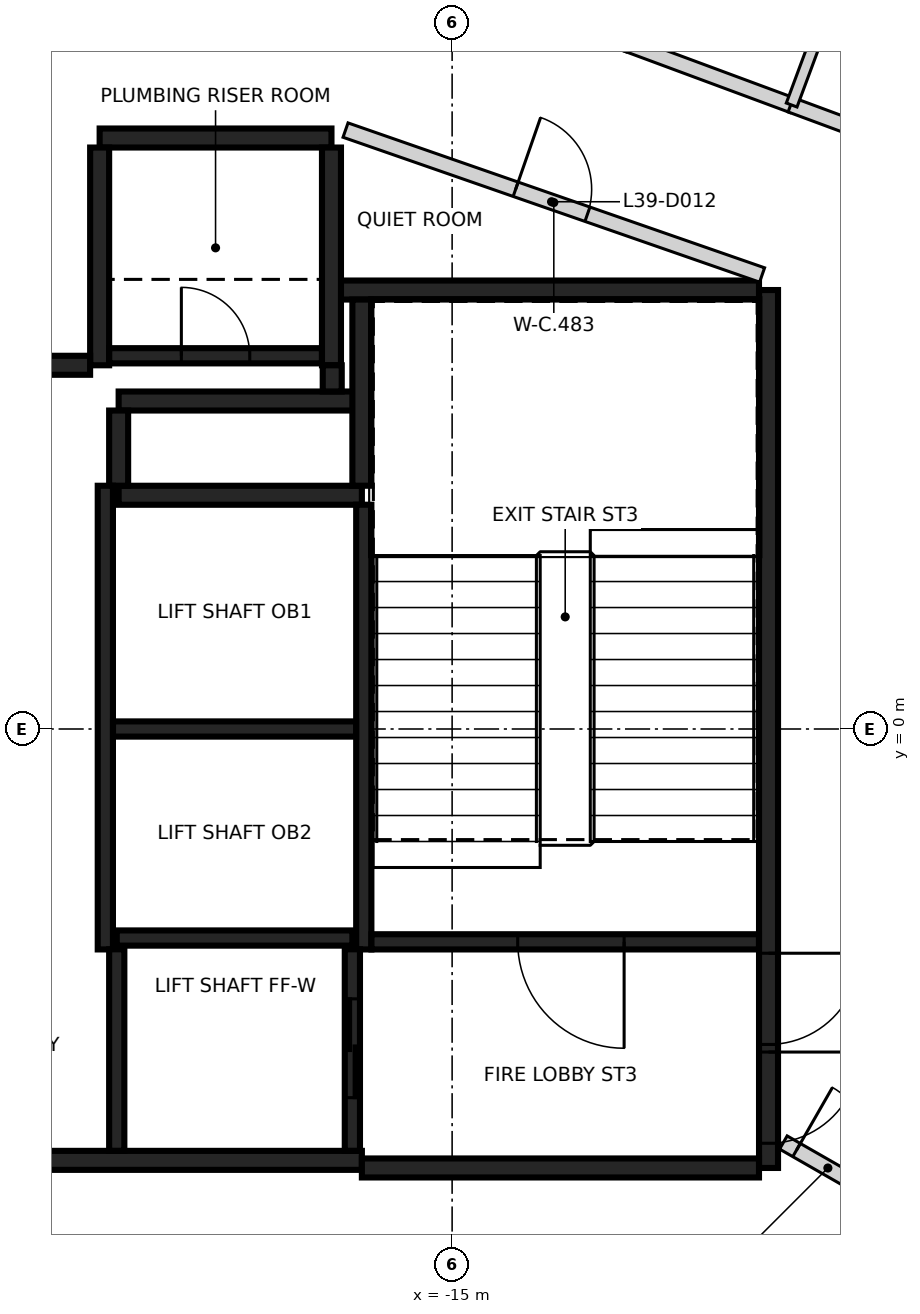
"""IFC4 building model, lengths in metres.
Left out: names, types, materials, properties, quantities, classifications, styles, units other than length and angle.
Written with IfcOpenShell. Run it as: python <this file> out.ifc"""

import sys

from ifc_helpers import new_model, si_unit, direction, frame, frame_2d, origin, place, context, subcontext, project, spatial, rectangle, extrude, element, fill, save


model = new_model("IFC4")
c1 = context("Model", 3, precision=1e-05, world=origin(), true_north=direction((0.0, 1.0)))
c2 = subcontext(c1, "Body", "Model", "MODEL_VIEW")
j1 = project(units=[si_unit("LENGTHUNIT", "METRE"), si_unit("PLANEANGLEUNIT", "RADIAN")], contexts=[c1])
p1 = place(None, origin())
s1 = spatial("IfcSite", under=j1, at=p1, CompositionType="ELEMENT")
p2 = place(p1, origin())
s2 = spatial("IfcBuilding", under=s1, at=p2, CompositionType="ELEMENT")
p3 = place(p2, frame((0.0, 0.0, 157.6)))
s3 = spatial("IfcBuildingStorey", under=s2, at=p3, CompositionType="ELEMENT", Elevation=157.6)
p4 = place(p3, frame((-10.837, 5.775, 0.0), z_axis=(0.0, 0.0, 1.0), x_axis=(0.0, -1.0, 0.0)))
e1 = element("IfcWall", 1, at=p4, inside=s3, PredefinedType="SHEAR", context=c2, shape_type="SweptSolid", body=[
    extrude(rectangle(XDim=11.55, YDim=0.25, at=frame_2d((5.775, 0.0))), origin(), (0.0, 0.0, 1.0), 3.2),
])
p5 = place(p4, frame((10.025, 0.0, 0.0)))
e2 = element("IfcOpeningElement", 2, at=p5, cuts=e1, PredefinedType="OPENING", context=c2, shape_type="SweptSolid", body=[
    extrude(rectangle(XDim=1.2, YDim=2.1, at=frame_2d((0.6, 1.05))), frame((0.0, 0.135, 0.0), z_axis=(0.0, -1.0, 0.0), x_axis=(1.0, 0.0, 0.0)), (0.0, 0.0, 1.0), 0.27),
])
p6 = place(p4, frame((8.725, 0.0, 0.0)))
e3 = element("IfcOpeningElement", 3, at=p6, cuts=e1, PredefinedType="OPENING", context=c2, shape_type="SweptSolid", body=[
    extrude(rectangle(XDim=1.2, YDim=2.1, at=frame_2d((0.6, 1.05))), frame((0.0, 0.135, 0.0), z_axis=(0.0, -1.0, 0.0), x_axis=(1.0, 0.0, 0.0)), (0.0, 0.0, 1.0), 0.27),
])
p7 = place(p3, frame((-16.187, -5.675, 0.0), z_axis=(0.0, 0.0, 1.0), x_axis=(-1.0, 0.0, 0.0)))
e4 = element("IfcWall", 4, at=p7, inside=s3, PredefinedType="SHEAR", context=c2, shape_type="SweptSolid", body=[
    extrude(rectangle(XDim=6.25, YDim=0.25, at=frame_2d((3.125, 0.0))), origin(), (0.0, 0.0, 1.0), 3.2),
])
p8 = place(p3, frame((-10.963, -5.775, 0.0), z_axis=(0.0, 0.0, 1.0), x_axis=(-1.0, 0.0, 0.0)))
e5 = element("IfcWall", 5, at=p8, inside=s3, PredefinedType="SHEAR", context=c2, shape_type="SweptSolid", body=[
    extrude(rectangle(XDim=5.225, YDim=0.25, at=frame_2d((2.612, 0.0))), origin(), (0.0, 0.0, 1.0), 3.2),
])
p9 = place(p3, frame((-16.472, 5.775, 0.0), z_axis=(0.0, 0.0, 1.0), x_axis=(1.0, 0.0, 0.0)))
e6 = element("IfcWall", 6, at=p9, inside=s3, PredefinedType="SHEAR", context=c2, shape_type="SweptSolid", body=[
    extrude(rectangle(XDim=5.51, YDim=0.25, at=frame_2d((2.755, 0.0))), origin(), (0.0, 0.0, 1.0), 3.2),
])
p10 = place(p3, frame((-19.387, 3.075, 0.0), z_axis=(0.0, 0.0, 1.0), x_axis=(1.0, 0.0, 0.0)))
e7 = element("IfcWall", 7, at=p10, inside=s3, PredefinedType="SHEAR", context=c2, shape_type="SweptSolid", body=[
    extrude(rectangle(XDim=3.2, YDim=0.25, at=frame_2d((1.6, 0.0))), origin(), (0.0, 0.0, 1.0), 3.2),
])
p11 = place(p3, frame((-19.637, 7.775, 0.0), z_axis=(0.0, 0.0, 1.0), x_axis=(1.0, 0.0, 0.0)))
e8 = element("IfcWall", 8, at=p11, inside=s3, PredefinedType="SHEAR", context=c2, shape_type="SweptSolid", body=[
    extrude(rectangle(XDim=3.05, YDim=0.25, at=frame_2d((1.525, 0.0))), origin(), (0.0, 0.0, 1.0), 3.2),
])
for number, where, z_axis, x_axis in (
    (9, (-16.587, 7.65, 0.0), (0.0, 0.0, 1.0), (0.0, -1.0, 0.0)),
    (10, (-19.637, 4.785, 0.0), (0.0, 0.0, 1.0), (0.0, 1.0, 0.0)),
):
    element("IfcWall", number, at=place(p3, frame(where, z_axis=z_axis, x_axis=x_axis)), inside=s3, PredefinedType="SHEAR", context=c2, shape_type="SweptSolid", body=[
        extrude(rectangle(XDim=2.865, YDim=0.25, at=frame_2d((1.432, 0.0))), origin(), (0.0, 0.0, 1.0), 3.2),
    ])
p12 = place(p3, frame((-16.302, 4.315, 0.0), z_axis=(0.0, 0.0, 1.0), x_axis=(-1.0, 0.0, 0.0)))
e11 = element("IfcWall", 11, at=p12, inside=s3, PredefinedType="SHEAR", context=c2, shape_type="SweptSolid", body=[
    extrude(rectangle(XDim=3.085, YDim=0.25, at=frame_2d((1.542, 0.0))), origin(), (0.0, 0.0, 1.0), 3.2),
])
p13 = place(p3, frame((-16.187, 3.2, 0.0), z_axis=(0.0, 0.0, 1.0), x_axis=(0.0, 1.0, 0.0)))
e12 = element("IfcWall", 12, at=p13, inside=s3, PredefinedType="SHEAR", context=c2, shape_type="SweptSolid", body=[
    extrude(rectangle(XDim=2.449, YDim=0.25, at=frame_2d((1.225, 0.0))), origin(), (0.0, 0.0, 1.0), 3.2),
])
p14 = place(p3, frame((-19.387, 4.19, 0.0), z_axis=(0.0, 0.0, 1.0), x_axis=(0.0, -1.0, 0.0)))
e13 = element("IfcWall", 13, at=p14, inside=s3, PredefinedType="SHEAR", context=c2, shape_type="SweptSolid", body=[
    extrude(rectangle(XDim=0.989, YDim=0.25, at=frame_2d((0.495, 0.0))), origin(), (0.0, 0.0, 1.0), 3.2),
])
p15 = place(p3, frame((-20.447, 4.785, 0.0), z_axis=(0.0, 0.0, 1.0), x_axis=(1.0, 0.0, 0.0)))
e14 = element("IfcWall", 14, at=p15, inside=s3, PredefinedType="SHEAR", context=c2, shape_type="SweptSolid", body=[
    extrude(rectangle(XDim=0.685, YDim=0.25, at=frame_2d((0.342, 0.0))), origin(), (0.0, 0.0, 1.0), 3.2),
])
p16 = place(p3, frame((-16.577, 4.785, 0.0), z_axis=(0.0, 0.0, 1.0), x_axis=(0.0, -1.0, 0.0)))
e15 = element("IfcWall", 15, at=p16, inside=s3, PredefinedType="SHEAR", context=c2, shape_type="SweptSolid", body=[
    extrude(rectangle(XDim=0.344, YDim=0.25, at=frame_2d((0.172, 0.0))), origin(), (0.0, 0.0, 1.0), 3.2),
])
p17 = place(p3, frame((-16.162, 2.951, 0.0), z_axis=(0.0, 0.0, 1.0), x_axis=(0.0, -1.0, 0.0)))
e16 = element("IfcWall", 16, at=p17, inside=s3, PredefinedType="SHEAR", context=c2, shape_type="SweptSolid", body=[
    extrude(rectangle(XDim=5.851, YDim=0.2, at=frame_2d((2.925, 0.0))), origin(), (0.0, 0.0, 1.0), 3.2),
])
p18 = place(p3, frame((-19.562, -2.9, 0.0), z_axis=(0.0, 0.0, 1.0), x_axis=(0.0, 1.0, 0.0)))
e17 = element("IfcWall", 17, at=p18, inside=s3, PredefinedType="SHEAR", context=c2, shape_type="SweptSolid", body=[
    extrude(rectangle(XDim=6.1, YDim=0.2, at=frame_2d((3.05, 0.0))), origin(), (0.0, 0.0, 1.0), 3.2),
])
p19 = place(p3, frame((-10.963, -2.8, 0.0), z_axis=(0.0, 0.0, 1.0), x_axis=(-1.0, 0.0, 0.0)))
e18 = element("IfcWall", 18, at=p19, inside=s3, PredefinedType="SHEAR", context=c2, shape_type="SweptSolid", body=[
    extrude(rectangle(XDim=5.098, YDim=0.2, at=frame_2d((2.549, 0.0))), origin(), (0.0, 0.0, 1.0), 3.2),
])
p20 = place(p19, frame((1.774, 0.0, 0.0)))
e19 = element("IfcOpeningElement", 19, at=p20, cuts=e18, PredefinedType="OPENING", context=c2, shape_type="SweptSolid", body=[
    extrude(rectangle(XDim=1.4, YDim=2.1, at=frame_2d((0.7, 1.05))), frame((0.0, 0.11, 0.0), z_axis=(0.0, -1.0, 0.0), x_axis=(1.0, 0.0, 0.0)), (0.0, 0.0, 1.0), 0.22),
])
p21 = place(p3, frame((-16.263, 0.0, 0.0), z_axis=(0.0, 0.0, 1.0), x_axis=(-1.0, 0.0, 0.0)))
e20 = element("IfcWall", 20, at=p21, inside=s3, PredefinedType="SHEAR", context=c2, shape_type="SweptSolid", body=[
    extrude(rectangle(XDim=3.198, YDim=0.2, at=frame_2d((1.599, 0.0))), origin(), (0.0, 0.0, 1.0), 3.2),
])
p22 = place(p3, frame((-19.511, 4.91, 0.0), z_axis=(0.0, 0.0, 1.0), x_axis=(1.0, 0.0, 0.0)))
e21 = element("IfcWall", 21, at=p22, inside=s3, PredefinedType="SHEAR", context=c2, shape_type="SweptSolid", body=[
    extrude(rectangle(XDim=2.798, YDim=0.2, at=frame_2d((1.399, 0.0))), origin(), (0.0, 0.0, 1.0), 3.2),
])
p23 = place(p22, frame((0.949, 0.0, 0.0)))
e22 = element("IfcOpeningElement", 22, at=p23, cuts=e21, PredefinedType="OPENING", context=c2, shape_type="SweptSolid", body=[
    extrude(rectangle(XDim=0.9, YDim=2.1, at=frame_2d((0.45, 1.05))), frame((0.0, 0.11, 0.0), z_axis=(0.0, -1.0, 0.0), x_axis=(1.0, 0.0, 0.0)), (0.0, 0.0, 1.0), 0.22),
])
p24 = place(p3, frame((-19.412, -2.75, 0.0), z_axis=(0.0, 0.0, 1.0), x_axis=(1.0, 0.0, 0.0)))
e23 = element("IfcWall", 23, at=p24, inside=s3, PredefinedType="SHEAR", context=c2, shape_type="SweptSolid", body=[
    extrude(rectangle(XDim=3.1, YDim=0.2, at=frame_2d((1.55, 0.0))), origin(), (0.0, 0.0, 1.0), 3.2),
])
p25 = place(p3, frame((-16.312, -2.898, 0.0), z_axis=(0.0, 0.0, 1.0), x_axis=(0.0, -1.0, 0.0)))
e24 = element("IfcWall", 24, at=p25, inside=s3, PredefinedType="SHEAR", context=c2, shape_type="SweptSolid", body=[
    extrude(rectangle(XDim=2.651, YDim=0.2, at=frame_2d((1.325, 0.0))), origin(), (0.0, 0.0, 1.0), 3.2),
])
p26 = place(p25, frame((0.652, 0.0, 0.0)))
e25 = element("IfcOpeningElement", 25, at=p26, cuts=e24, PredefinedType="OPENING", context=c2, shape_type="SweptSolid", body=[
    extrude(rectangle(XDim=1.3, YDim=2.1, at=frame_2d((0.65, 1.05))), frame((0.0, 0.11, 0.0), z_axis=(0.0, -1.0, 0.0), x_axis=(1.0, 0.0, 0.0)), (0.0, 0.0, 1.0), 0.22),
])
p27 = place(p3, frame((-19.412, -5.549, 0.0), z_axis=(0.0, 0.0, 1.0), x_axis=(0.0, 1.0, 0.0)))
e26 = element("IfcWall", 26, at=p27, inside=s3, PredefinedType="SHEAR", context=c2, shape_type="SweptSolid", body=[
    extrude(rectangle(XDim=2.651, YDim=0.2, at=frame_2d((1.325, 0.0))), origin(), (0.0, 0.0, 1.0), 3.2),
])
p28 = place(p3, frame((-16.402, 7.879, 0.0), z_axis=(0.0, 0.0, 1.0), x_axis=(0.944492255471, -0.328533680702, 0.0)))
e27 = element("IfcWall", 27, at=p28, inside=s3, PredefinedType="PARTITIONING", context=c2, shape_type="SweptSolid", body=[
    extrude(rectangle(XDim=5.802, YDim=0.2, at=frame_2d((2.901, 0.0))), origin(), (0.0, 0.0, 1.0), 3.2),
])
p29 = place(p28, frame((2.37, 0.0, 0.0)))
e28 = element("IfcOpeningElement", 28, at=p29, cuts=e27, PredefinedType="OPENING", context=c2, shape_type="SweptSolid", body=[
    extrude(rectangle(XDim=1.0, YDim=2.1, at=frame_2d((0.5, 1.05))), frame((0.0, 0.11, 0.0), z_axis=(0.0, -1.0, 0.0), x_axis=(1.0, 0.0, 0.0)), (0.0, 0.0, 1.0), 0.22),
])
p30 = place(p3, frame((-12.699, 9.011, 0.0), z_axis=(0.0, 0.0, 1.0), x_axis=(0.937666284737, -0.347536959858, 0.0)))
e29 = element("IfcWall", 29, at=p30, inside=s3, PredefinedType="PARTITIONING", context=c2, shape_type="SweptSolid", body=[
    extrude(rectangle(XDim=2.322, YDim=0.2, at=frame_2d((1.161, 0.0))), origin(), (0.0, 0.0, 1.0), 3.2),
])
p31 = place(p3, frame((-10.642, -5.44, 0.0), z_axis=(0.0, 0.0, 1.0), x_axis=(0.867610688994, -0.497244097344, 0.0)))
e30 = element("IfcWall", 30, at=p31, inside=s3, PredefinedType="PARTITIONING", context=c2, shape_type="SweptSolid", body=[
    extrude(rectangle(XDim=10.464, YDim=0.2, at=frame_2d((5.232, 0.0))), origin(), (0.0, 0.0, 1.0), 3.2),
])
p32 = place(p31, frame((0.2, 0.0, 0.0)))
e31 = element("IfcOpeningElement", 31, at=p32, cuts=e30, PredefinedType="OPENING", context=c2, shape_type="SweptSolid", body=[
    extrude(rectangle(XDim=0.95, YDim=2.1, at=frame_2d((0.475, 1.05))), frame((0.0, 0.11, 0.0), z_axis=(0.0, -1.0, 0.0), x_axis=(1.0, 0.0, 0.0)), (0.0, 0.0, 1.0), 0.22),
])
p33 = place(p31, frame((7.519, 0.0, 0.0)))
e32 = element("IfcOpeningElement", 32, at=p33, cuts=e30, PredefinedType="OPENING", context=c2, shape_type="SweptSolid", body=[
    extrude(rectangle(XDim=0.95, YDim=2.1, at=frame_2d((0.475, 1.05))), frame((0.0, 0.11, 0.0), z_axis=(0.0, -1.0, 0.0), x_axis=(1.0, 0.0, 0.0)), (0.0, 0.0, 1.0), 0.22),
])
p34 = place(p31, frame((8.846, 0.0, 0.0)))
e33 = element("IfcOpeningElement", 33, at=p34, cuts=e30, PredefinedType="OPENING", context=c2, shape_type="SweptSolid", body=[
    extrude(rectangle(XDim=0.95, YDim=2.1, at=frame_2d((0.475, 1.05))), frame((0.0, 0.11, 0.0), z_axis=(0.0, -1.0, 0.0), x_axis=(1.0, 0.0, 0.0)), (0.0, 0.0, 1.0), 0.22),
])
p35 = place(p3, frame((-10.545, 8.212, 0.0), z_axis=(0.0, 0.0, 1.0), x_axis=(0.937637162141, -0.347615523491, 0.0)))
e34 = element("IfcWall", 34, at=p35, inside=s3, PredefinedType="PARTITIONING", context=c2, shape_type="SweptSolid", body=[
    extrude(rectangle(XDim=1.61, YDim=0.2, at=frame_2d((0.805, 0.0))), origin(), (0.0, 0.0, 1.0), 3.2),
])
p36 = place(p3, frame((-12.279, 16.946, 0.0), z_axis=(0.0, 0.0, 1.0), x_axis=(0.500003997498, -0.866023095816, 0.0)))
e35 = element("IfcWall", 35, at=p36, inside=s3, PredefinedType="PARTITIONING", context=c2, shape_type="SweptSolid", body=[
    extrude(rectangle(XDim=10.809, YDim=0.2, at=frame_2d((5.405, 0.0))), origin(), (0.0, 0.0, 1.0), 3.2),
])
p37 = place(p3, frame((-10.533, 8.209, 0.0), z_axis=(0.0, 0.0, 1.0), x_axis=(0.348035300423, 0.937481428968, 0.0)))
e36 = element("IfcWall", 36, at=p37, inside=s3, PredefinedType="PARTITIONING", context=c2, shape_type="SweptSolid", body=[
    extrude(rectangle(XDim=3.0, YDim=0.15, at=frame_2d((1.5, 0.0))), origin(), (0.0, 0.0, 1.0), 3.2),
])
p38 = place(p37, frame((1.1, 0.0, 0.0)))
e37 = element("IfcOpeningElement", 37, at=p38, cuts=e36, PredefinedType="OPENING", context=c2, shape_type="SweptSolid", body=[
    extrude(rectangle(XDim=0.8, YDim=2.1, at=frame_2d((0.4, 1.05))), frame((0.0, 0.085, 0.0), z_axis=(0.0, -1.0, 0.0), x_axis=(1.0, 0.0, 0.0)), (0.0, 0.0, 1.0), 0.17),
])
p39 = place(p3, frame((-10.454, -9.003, 0.0), z_axis=(0.0, 0.0, 1.0), x_axis=(0.49740127306, 0.867520589703, 0.0)))
e38 = element("IfcWall", 38, at=p39, inside=s3, PredefinedType="PARTITIONING", context=c2, shape_type="SweptSolid", body=[
    extrude(rectangle(XDim=2.998, YDim=0.15, at=frame_2d((1.499, 0.0))), origin(), (0.0, 0.0, 1.0), 3.2),
])
p40 = place(p39, frame((1.098, 0.0, 0.0)))
e39 = element("IfcOpeningElement", 39, at=p40, cuts=e38, PredefinedType="OPENING", context=c2, shape_type="SweptSolid", body=[
    extrude(rectangle(XDim=0.8, YDim=2.1, at=frame_2d((0.4, 1.05))), frame((0.0, 0.085, 0.0), z_axis=(0.0, -1.0, 0.0), x_axis=(1.0, 0.0, 0.0)), (0.0, 0.0, 1.0), 0.17),
])
p41 = place(p26, origin())
e40 = element("IfcDoor", 40, at=p41, inside=s3, OperationType="SLIDING_TO_LEFT", PredefinedType="DOOR", context=c2, shape_type="SweptSolid", body=[
    extrude(rectangle(XDim=1.3, YDim=2.1, at=frame_2d((0.65, 1.05))), frame((0.0, 0.025, 0.0), z_axis=(0.0, -1.0, 0.0), x_axis=(1.0, 0.0, 0.0)), (0.0, 0.0, 1.0), 0.05),
])
fill(e25, e40)
p42 = place(p5, origin())
e41 = element("IfcDoor", 41, at=p42, inside=s3, OperationType="SINGLE_SWING_LEFT", PredefinedType="DOOR", context=c2, shape_type="SweptSolid", body=[
    extrude(rectangle(XDim=1.2, YDim=2.1, at=frame_2d((0.6, 1.05))), frame((0.0, 0.025, 0.0), z_axis=(0.0, -1.0, 0.0), x_axis=(1.0, 0.0, 0.0)), (0.0, 0.0, 1.0), 0.05),
])
fill(e2, e41)
p43 = place(p6, origin())
e42 = element("IfcDoor", 42, at=p43, inside=s3, OperationType="SINGLE_SWING_RIGHT", PredefinedType="DOOR", context=c2, shape_type="SweptSolid", body=[
    extrude(rectangle(XDim=1.2, YDim=2.1, at=frame_2d((0.6, 1.05))), frame((0.0, 0.025, 0.0), z_axis=(0.0, -1.0, 0.0), x_axis=(1.0, 0.0, 0.0)), (0.0, 0.0, 1.0), 0.05),
])
fill(e3, e42)
p44 = place(p20, origin())
e43 = element("IfcDoor", 43, at=p44, inside=s3, OperationType="SINGLE_SWING_LEFT", PredefinedType="DOOR", context=c2, shape_type="SweptSolid", body=[
    extrude(rectangle(XDim=1.4, YDim=2.1, at=frame_2d((0.7, 1.05))), frame((0.0, 0.025, 0.0), z_axis=(0.0, -1.0, 0.0), x_axis=(1.0, 0.0, 0.0)), (0.0, 0.0, 1.0), 0.05),
])
fill(e19, e43)
p45 = place(p23, origin())
e44 = element("IfcDoor", 44, at=p45, inside=s3, OperationType="SINGLE_SWING_RIGHT", PredefinedType="DOOR", context=c2, shape_type="SweptSolid", body=[
    extrude(rectangle(XDim=0.9, YDim=2.1, at=frame_2d((0.45, 1.05))), frame((0.0, 0.025, 0.0), z_axis=(0.0, -1.0, 0.0), x_axis=(1.0, 0.0, 0.0)), (0.0, 0.0, 1.0), 0.05),
])
fill(e22, e44)
p46 = place(p29, frame((1.0, 0.0, 0.0), z_axis=(0.0, 0.0, 1.0), x_axis=(-1.0, 0.0, 0.0)))
e45 = element("IfcDoor", 45, at=p46, inside=s3, OperationType="SINGLE_SWING_LEFT", PredefinedType="DOOR", context=c2, shape_type="SweptSolid", body=[
    extrude(rectangle(XDim=1.0, YDim=2.1, at=frame_2d((0.5, 1.05))), frame((0.0, 0.025, 0.0), z_axis=(0.0, -1.0, 0.0), x_axis=(1.0, 0.0, 0.0)), (0.0, 0.0, 1.0), 0.05),
])
fill(e28, e45)
p47 = place(p32, frame((0.95, 0.0, 0.0), z_axis=(0.0, 0.0, 1.0), x_axis=(-1.0, 0.0, 0.0)))
e46 = element("IfcDoor", 46, at=p47, inside=s3, OperationType="SINGLE_SWING_LEFT", PredefinedType="DOOR", context=c2, shape_type="SweptSolid", body=[
    extrude(rectangle(XDim=0.95, YDim=2.1, at=frame_2d((0.475, 1.05))), frame((0.0, 0.025, 0.0), z_axis=(0.0, -1.0, 0.0), x_axis=(1.0, 0.0, 0.0)), (0.0, 0.0, 1.0), 0.05),
])
fill(e31, e46)
save(model, sys.argv[1])
